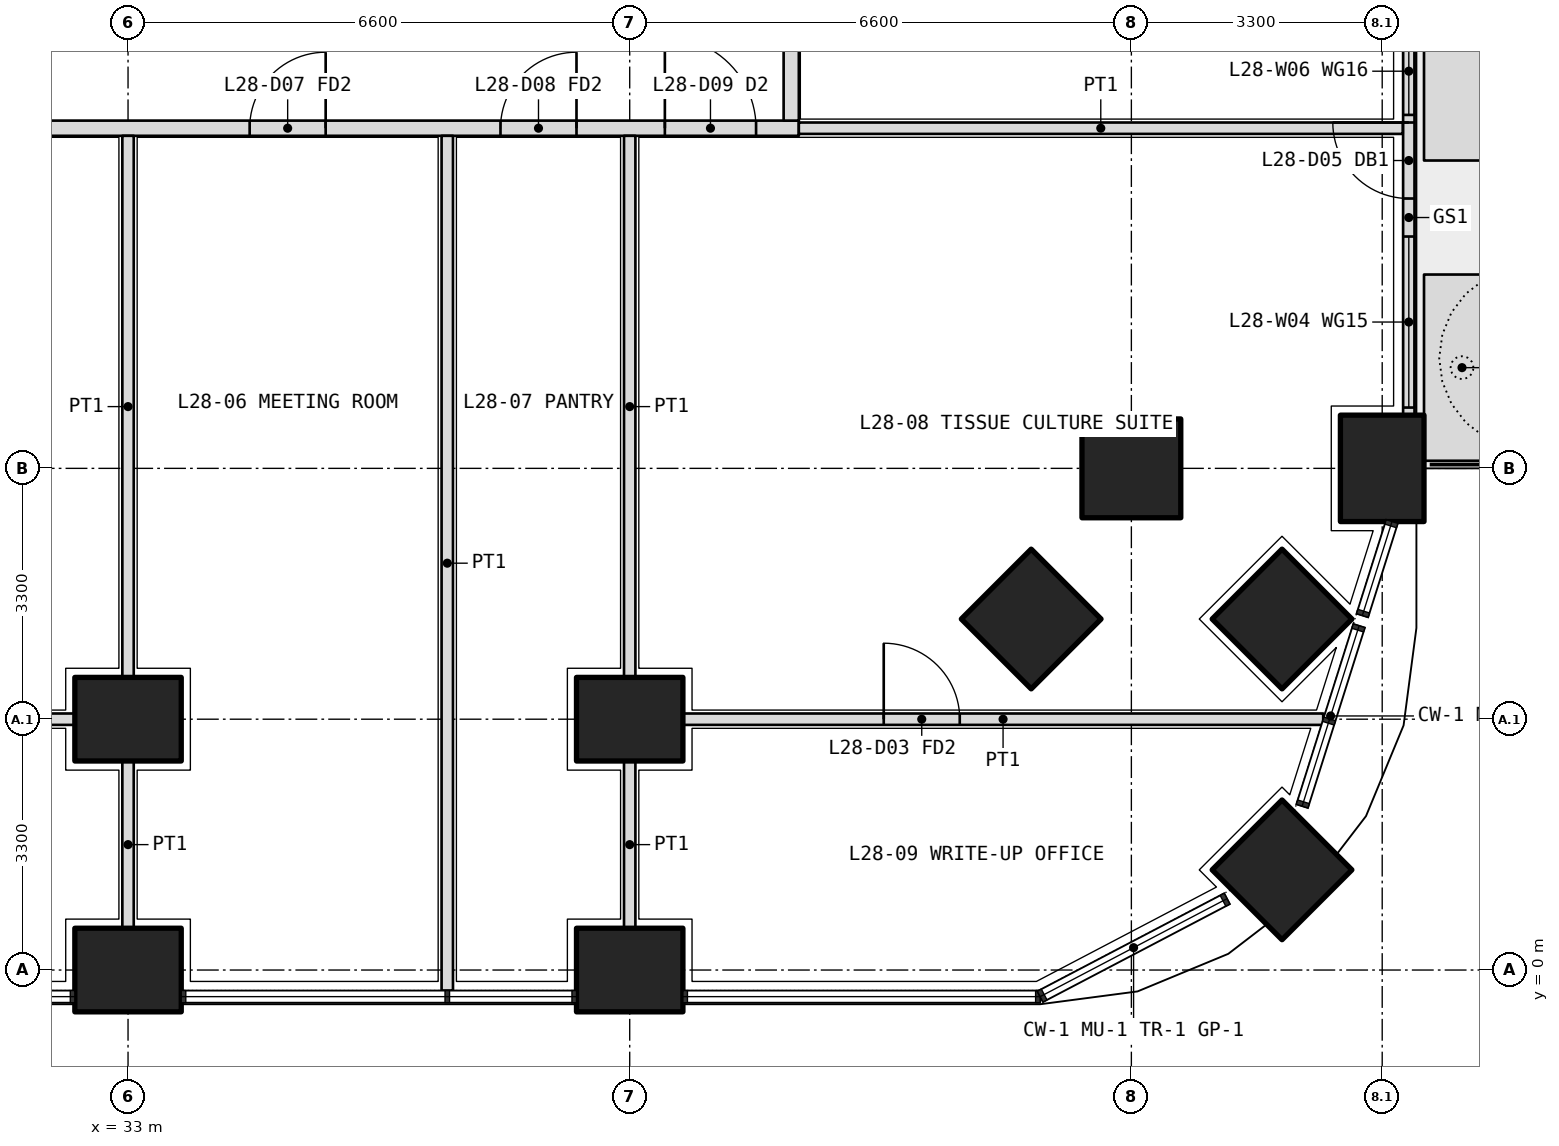
"""IFC4 building model, lengths in metres.
Left out: names, types, materials, properties, quantities, classifications, styles, units other than length and angle.
Written with IfcOpenShell. Run it as: python <this file> out.ifc"""

import sys

from ifc_helpers import new_model, si_unit, direction, frame, frame_2d, origin, origin_2d, place, context, subcontext, project, spatial, polyline, rectangle, outline, extrude, element, fill, save


model = new_model("IFC4")
c1 = context("Model", 3, precision=1e-05, world=origin(), true_north=direction((0.0, 1.0)))
c2 = subcontext(c1, "Body", "Model", "MODEL_VIEW")
j1 = project(units=[si_unit("LENGTHUNIT", "METRE"), si_unit("PLANEANGLEUNIT", "RADIAN")], contexts=[c1])
p1 = place(None, origin())
s1 = spatial("IfcSite", under=j1, at=p1, CompositionType="ELEMENT")
p2 = place(p1, origin())
s2 = spatial("IfcBuilding", under=s1, at=p2, CompositionType="ELEMENT")
p3 = place(p2, frame((0.0, 0.0, 124.2)))
s3 = spatial("IfcBuildingStorey", under=s2, at=p3, CompositionType="ELEMENT", Elevation=124.2)
p4 = place(p3, frame((48.182, 1.318, 0.0), z_axis=(0.0, 0.0, 1.0), x_axis=(0.707106781187, 0.707106781187, 0.0)))
e1 = element("IfcColumn", 1, at=p4, inside=s3, PredefinedType="COLUMN", context=c2, shape_type="SweptSolid", body=[
    extrude(rectangle(XDim=1.3, YDim=1.3, at=origin_2d()), origin(), (0.0, 0.0, 1.0), 4.2),
])
for number, where, z_axis, x_axis in (
    (2, (33.0, 0.0, 0.0), (0.0, 0.0, 1.0), (1.0, 0.0, 0.0)),
    (3, (39.6, 0.0, 0.0), (0.0, 0.0, 1.0), (1.0, 0.0, 0.0)),
    (4, (49.5, 6.6, 0.0), (0.0, 0.0, 1.0), (0.0, 1.0, 0.0)),
):
    element("IfcColumn", number, at=place(p3, frame(where, z_axis=z_axis, x_axis=x_axis)), inside=s3, PredefinedType="COLUMN", context=c2, shape_type="SweptSolid", body=[
        extrude(rectangle(XDim=1.4, YDim=1.1, at=origin_2d()), origin(), (0.0, 0.0, 1.0), 4.2),
    ])
for number, where, z_axis, x_axis in (
    (5, (46.2, 6.6, 0.0), (0.0, 0.0, 1.0), (1.0, 0.0, 0.0)),
    (6, (48.182, 4.618, 0.0), (0.0, 0.0, 1.0), (0.707, 0.707, 0.0)),
):
    element("IfcColumn", number, at=place(p3, frame(where, z_axis=z_axis, x_axis=x_axis)), inside=s3, PredefinedType="COLUMN", context=c2, shape_type="SweptSolid", body=[
        extrude(rectangle(XDim=1.3, YDim=1.3, at=origin_2d()), origin(), (0.0, 0.0, 1.0), 4.2),
    ])
for number, where, z_axis, x_axis in (
    (7, (33.0, 3.3, 0.0), (0.0, 0.0, 1.0), (1.0, 0.0, 0.0)),
    (8, (39.6, 3.3, 0.0), (0.0, 0.0, 1.0), (1.0, 0.0, 0.0)),
):
    element("IfcColumn", number, at=place(p3, frame(where, z_axis=z_axis, x_axis=x_axis)), inside=s3, PredefinedType="COLUMN", context=c2, shape_type="SweptSolid", body=[
        extrude(rectangle(XDim=1.4, YDim=1.1, at=origin_2d()), origin(), (0.0, 0.0, 1.0), 4.2),
    ])
p5 = place(p3, frame((44.882, 4.618, 0.0), z_axis=(0.0, 0.0, 1.0), x_axis=(0.707106781187, 0.707106781187, 0.0)))
e9 = element("IfcColumn", 9, at=p5, inside=s3, PredefinedType="COLUMN", context=c2, shape_type="SweptSolid", body=[
    extrude(rectangle(XDim=1.3, YDim=1.3, at=origin_2d()), origin(), (0.0, 0.0, 1.0), 4.2),
])
p6 = place(p3, origin())
e10 = element("IfcWall", 10, at=p6, inside=s3, PredefinedType="USERDEFINED", context=c2, shape_type="SweptSolid", body=[
    extrude(outline(polyline([(50.05, 6.7), (51.05, 6.7), (51.05, 9.15), (50.05, 9.15), (50.05, 6.7)]), holes=[polyline([(50.2, 6.85), (50.9, 6.85), (50.9, 9.0), (50.2, 9.0), (50.2, 6.85)])]), origin(), (0.0, 0.0, 1.0), 1.05),
])
p7 = place(p3, origin())
e11 = element("IfcWall", 11, at=p7, inside=s3, PredefinedType="USERDEFINED", context=c2, shape_type="SweptSolid", body=[
    extrude(outline(polyline([(50.05, 10.65), (51.05, 10.65), (51.05, 19.7), (50.05, 19.7), (50.05, 10.65)]), holes=[polyline([(50.2, 10.8), (50.9, 10.8), (50.9, 19.55), (50.2, 19.55), (50.2, 10.8)])]), origin(), (0.0, 0.0, 1.0), 1.05),
])
p8 = place(p3, frame((49.85, 7.3, 0.0), z_axis=(0.0, 0.0, 1.0), x_axis=(0.0, 1.0, 0.0)))
e12 = element("IfcWall", 12, at=p8, inside=s3, PredefinedType="SOLIDWALL", context=c2, shape_type="SweptSolid", body=[
    extrude(rectangle(XDim=5.2, YDim=0.15, at=frame_2d((2.6, 0.0))), origin(), (0.0, 0.0, 1.0), 2.7),
])
p9 = place(p8, frame((2.85, 0.0, 0.0)))
e13 = element("IfcOpeningElement", 13, at=p9, cuts=e12, PredefinedType="OPENING", context=c2, shape_type="SweptSolid", body=[
    extrude(rectangle(XDim=1.0, YDim=2.4, at=frame_2d((0.5, 1.2))), frame((0.0, 0.085, 0.0), z_axis=(0.0, -1.0, 0.0), x_axis=(1.0, 0.0, 0.0)), (0.0, 0.0, 1.0), 0.17),
])
p10 = place(p8, frame((0.1, 0.0, 0.1)))
e14 = element("IfcOpeningElement", 14, at=p10, cuts=e12, PredefinedType="OPENING", context=c2, shape_type="SweptSolid", body=[
    extrude(rectangle(XDim=2.25, YDim=2.3, at=frame_2d((1.125, 1.15))), frame((0.0, 0.085, 0.0), z_axis=(0.0, -1.0, 0.0), x_axis=(1.0, 0.0, 0.0)), (0.0, 0.0, 1.0), 0.17),
])
p11 = place(p8, frame((3.95, 0.0, 0.1)))
e15 = element("IfcOpeningElement", 15, at=p11, cuts=e12, PredefinedType="OPENING", context=c2, shape_type="SweptSolid", body=[
    extrude(rectangle(XDim=1.15, YDim=2.3, at=frame_2d((0.575, 1.15))), frame((0.0, 0.085, 0.0), z_axis=(0.0, -1.0, 0.0), x_axis=(1.0, 0.0, 0.0)), (0.0, 0.0, 1.0), 0.17),
])
p12 = place(p3, frame((10.975, 11.075, 0.0), z_axis=(0.0, 0.0, 1.0), x_axis=(1.0, 0.0, 0.0)))
e16 = element("IfcWall", 16, at=p12, inside=s3, PredefinedType="PARTITIONING", context=c2, shape_type="SweptSolid", body=[
    extrude(rectangle(XDim=30.85, YDim=0.2, at=frame_2d((15.425, 0.0))), origin(), (0.0, 0.0, 1.0), 2.85),
])
p13 = place(p12, frame((10.462, 0.0, 0.0)))
e17 = element("IfcOpeningElement", 17, at=p13, cuts=e16, PredefinedType="OPENING", context=c2, shape_type="SweptSolid", body=[
    extrude(rectangle(XDim=1.2, YDim=2.1, at=frame_2d((0.6, 1.05))), frame((0.0, 0.11, 0.0), z_axis=(0.0, -1.0, 0.0), x_axis=(1.0, 0.0, 0.0)), (0.0, 0.0, 1.0), 0.22),
])
p14 = place(p12, frame((23.625, 0.0, 0.0)))
e18 = element("IfcOpeningElement", 18, at=p14, cuts=e16, PredefinedType="OPENING", context=c2, shape_type="SweptSolid", body=[
    extrude(rectangle(XDim=1.0, YDim=2.1, at=frame_2d((0.5, 1.05))), frame((0.0, 0.11, 0.0), z_axis=(0.0, -1.0, 0.0), x_axis=(1.0, 0.0, 0.0)), (0.0, 0.0, 1.0), 0.22),
])
p15 = place(p12, frame((26.925, 0.0, 0.0)))
e19 = element("IfcOpeningElement", 19, at=p15, cuts=e16, PredefinedType="OPENING", context=c2, shape_type="SweptSolid", body=[
    extrude(rectangle(XDim=1.0, YDim=2.1, at=frame_2d((0.5, 1.05))), frame((0.0, 0.11, 0.0), z_axis=(0.0, -1.0, 0.0), x_axis=(1.0, 0.0, 0.0)), (0.0, 0.0, 1.0), 0.22),
])
p16 = place(p12, frame((29.087, 0.0, 0.0)))
e20 = element("IfcOpeningElement", 20, at=p16, cuts=e16, PredefinedType="OPENING", context=c2, shape_type="SweptSolid", body=[
    extrude(rectangle(XDim=1.2, YDim=2.1, at=frame_2d((0.6, 1.05))), frame((0.0, 0.11, 0.0), z_axis=(0.0, -1.0, 0.0), x_axis=(1.0, 0.0, 0.0)), (0.0, 0.0, 1.0), 0.22),
])
p17 = place(p3, frame((41.725, 11.175, 0.0), z_axis=(0.0, 0.0, 1.0), x_axis=(0.0, 1.0, 0.0)))
e21 = element("IfcWall", 21, at=p17, inside=s3, PredefinedType="PARTITIONING", context=c2, shape_type="SweptSolid", body=[
    extrude(rectangle(XDim=5.325, YDim=0.2, at=frame_2d((2.663, 0.0))), origin(), (0.0, 0.0, 1.0), 2.85),
])
p18 = place(p17, frame((2.113, 0.0, 0.0)))
e22 = element("IfcOpeningElement", 22, at=p18, cuts=e21, PredefinedType="OPENING", context=c2, shape_type="SweptSolid", body=[
    extrude(rectangle(XDim=1.0, YDim=2.1, at=frame_2d((0.5, 1.05))), frame((0.0, 0.11, 0.0), z_axis=(0.0, -1.0, 0.0), x_axis=(1.0, 0.0, 0.0)), (0.0, 0.0, 1.0), 0.22),
])
p19 = place(p3, frame((49.77, 11.075, 0.0), z_axis=(0.0, 0.0, 1.0), x_axis=(-1.0, 0.0, 0.0)))
e23 = element("IfcWall", 23, at=p19, inside=s3, PredefinedType="PARTITIONING", context=c2, shape_type="SweptSolid", body=[
    extrude(rectangle(XDim=7.945, YDim=0.15, at=frame_2d((3.973, 0.0))), origin(), (0.0, 0.0, 1.0), 2.7),
])
p20 = place(p3, frame((27.1, 3.3, 0.0), z_axis=(0.0, 0.0, 1.0), x_axis=(1.0, 0.0, 0.0)))
e24 = element("IfcWall", 24, at=p20, inside=s3, PredefinedType="PARTITIONING", context=c2, shape_type="SweptSolid", body=[
    extrude(rectangle(XDim=5.2, YDim=0.15, at=frame_2d((2.6, 0.0))), origin(), (0.0, 0.0, 1.0), 2.85),
])
p21 = place(p3, frame((40.3, 3.3, 0.0), z_axis=(0.0, 0.0, 1.0), x_axis=(1.0, 0.0, 0.0)))
e25 = element("IfcWall", 25, at=p21, inside=s3, PredefinedType="PARTITIONING", context=c2, shape_type="SweptSolid", body=[
    extrude(rectangle(XDim=8.424, YDim=0.15, at=frame_2d((4.212, 0.0))), origin(), (0.0, 0.0, 1.0), 2.7),
])
p22 = place(p21, frame((2.642, 0.0, 0.0)))
e26 = element("IfcOpeningElement", 26, at=p22, cuts=e25, PredefinedType="OPENING", context=c2, shape_type="SweptSolid", body=[
    extrude(rectangle(XDim=1.0, YDim=2.1, at=frame_2d((0.5, 1.05))), frame((0.0, 0.085, 0.0), z_axis=(0.0, -1.0, 0.0), x_axis=(1.0, 0.0, 0.0)), (0.0, 0.0, 1.0), 0.17),
])
p23 = place(p3, frame((37.2, -0.27, 0.0), z_axis=(0.0, 0.0, 1.0), x_axis=(0.0, 1.0, 0.0)))
e27 = element("IfcWall", 27, at=p23, inside=s3, PredefinedType="PARTITIONING", context=c2, shape_type="SweptSolid", body=[
    extrude(rectangle(XDim=11.245, YDim=0.15, at=frame_2d((5.623, 0.0))), origin(), (0.0, 0.0, 1.0), 2.7),
])
p24 = place(p3, frame((39.6, 0.55, 0.0), z_axis=(0.0, 0.0, 1.0), x_axis=(0.0, 1.0, 0.0)))
e28 = element("IfcWall", 28, at=p24, inside=s3, PredefinedType="PARTITIONING", context=c2, shape_type="SweptSolid", body=[
    extrude(rectangle(XDim=2.2, YDim=0.15, at=frame_2d((1.1, 0.0))), origin(), (0.0, 0.0, 1.0), 2.85),
])
p25 = place(p3, frame((39.6, 3.85, 0.0), z_axis=(0.0, 0.0, 1.0), x_axis=(0.0, 1.0, 0.0)))
e29 = element("IfcWall", 29, at=p25, inside=s3, PredefinedType="PARTITIONING", context=c2, shape_type="SweptSolid", body=[
    extrude(rectangle(XDim=7.125, YDim=0.15, at=frame_2d((3.562, 0.0))), origin(), (0.0, 0.0, 1.0), 2.85),
])
p26 = place(p3, frame((33.0, 0.55, 0.0), z_axis=(0.0, 0.0, 1.0), x_axis=(0.0, 1.0, 0.0)))
e30 = element("IfcWall", 30, at=p26, inside=s3, PredefinedType="PARTITIONING", context=c2, shape_type="SweptSolid", body=[
    extrude(rectangle(XDim=2.2, YDim=0.15, at=frame_2d((1.1, 0.0))), origin(), (0.0, 0.0, 1.0), 2.85),
])
p27 = place(p3, frame((33.0, 3.85, 0.0), z_axis=(0.0, 0.0, 1.0), x_axis=(0.0, 1.0, 0.0)))
e31 = element("IfcWall", 31, at=p27, inside=s3, PredefinedType="PARTITIONING", context=c2, shape_type="SweptSolid", body=[
    extrude(rectangle(XDim=7.125, YDim=0.15, at=frame_2d((3.562, 0.0))), origin(), (0.0, 0.0, 1.0), 2.85),
])
p28 = place(p9, origin())
e32 = element("IfcDoor", 32, at=p28, inside=s3, OperationType="SINGLE_SWING_RIGHT", PredefinedType="DOOR", context=c2, shape_type="SweptSolid", body=[
    extrude(rectangle(XDim=1.0, YDim=2.4, at=frame_2d((0.5, 1.2))), frame((0.0, 0.025, 0.0), z_axis=(0.0, -1.0, 0.0), x_axis=(1.0, 0.0, 0.0)), (0.0, 0.0, 1.0), 0.05),
])
fill(e13, e32)
p29 = place(p10, origin())
e33 = element("IfcWindow", 33, at=p29, inside=s3, PartitioningType="SINGLE_PANEL", PredefinedType="WINDOW", context=c2, shape_type="SweptSolid", body=[
    extrude(rectangle(XDim=2.25, YDim=2.3, at=frame_2d((1.125, 1.15))), frame((0.0, 0.03, 0.0), z_axis=(0.0, -1.0, 0.0), x_axis=(1.0, 0.0, 0.0)), (0.0, 0.0, 1.0), 0.06),
])
fill(e14, e33)
p30 = place(p11, origin())
e34 = element("IfcWindow", 34, at=p30, inside=s3, PartitioningType="SINGLE_PANEL", PredefinedType="WINDOW", context=c2, shape_type="SweptSolid", body=[
    extrude(rectangle(XDim=1.15, YDim=2.3, at=frame_2d((0.575, 1.15))), frame((0.0, 0.03, 0.0), z_axis=(0.0, -1.0, 0.0), x_axis=(1.0, 0.0, 0.0)), (0.0, 0.0, 1.0), 0.06),
])
fill(e15, e34)
p31 = place(p14, origin())
e35 = element("IfcDoor", 35, at=p31, inside=s3, OperationType="SINGLE_SWING_RIGHT", PredefinedType="DOOR", context=c2, shape_type="SweptSolid", body=[
    extrude(rectangle(XDim=1.0, YDim=2.1, at=frame_2d((0.5, 1.05))), frame((0.0, 0.025, 0.0), z_axis=(0.0, -1.0, 0.0), x_axis=(1.0, 0.0, 0.0)), (0.0, 0.0, 1.0), 0.05),
])
fill(e18, e35)
p32 = place(p15, origin())
e36 = element("IfcDoor", 36, at=p32, inside=s3, OperationType="SINGLE_SWING_RIGHT", PredefinedType="DOOR", context=c2, shape_type="SweptSolid", body=[
    extrude(rectangle(XDim=1.0, YDim=2.1, at=frame_2d((0.5, 1.05))), frame((0.0, 0.025, 0.0), z_axis=(0.0, -1.0, 0.0), x_axis=(1.0, 0.0, 0.0)), (0.0, 0.0, 1.0), 0.05),
])
fill(e19, e36)
p33 = place(p16, origin())
e37 = element("IfcDoor", 37, at=p33, inside=s3, OperationType="DOUBLE_DOOR_SINGLE_SWING", PredefinedType="DOOR", context=c2, shape_type="SweptSolid", body=[
    extrude(rectangle(XDim=1.2, YDim=2.1, at=frame_2d((0.6, 1.05))), frame((0.0, 0.025, 0.0), z_axis=(0.0, -1.0, 0.0), x_axis=(1.0, 0.0, 0.0)), (0.0, 0.0, 1.0), 0.05),
])
fill(e20, e37)
p34 = place(p22, origin())
e38 = element("IfcDoor", 38, at=p34, inside=s3, OperationType="SINGLE_SWING_LEFT", PredefinedType="DOOR", context=c2, shape_type="SweptSolid", body=[
    extrude(rectangle(XDim=1.0, YDim=2.1, at=frame_2d((0.5, 1.05))), frame((0.0, 0.025, 0.0), z_axis=(0.0, -1.0, 0.0), x_axis=(1.0, 0.0, 0.0)), (0.0, 0.0, 1.0), 0.05),
])
fill(e26, e38)
save(model, sys.argv[1])
